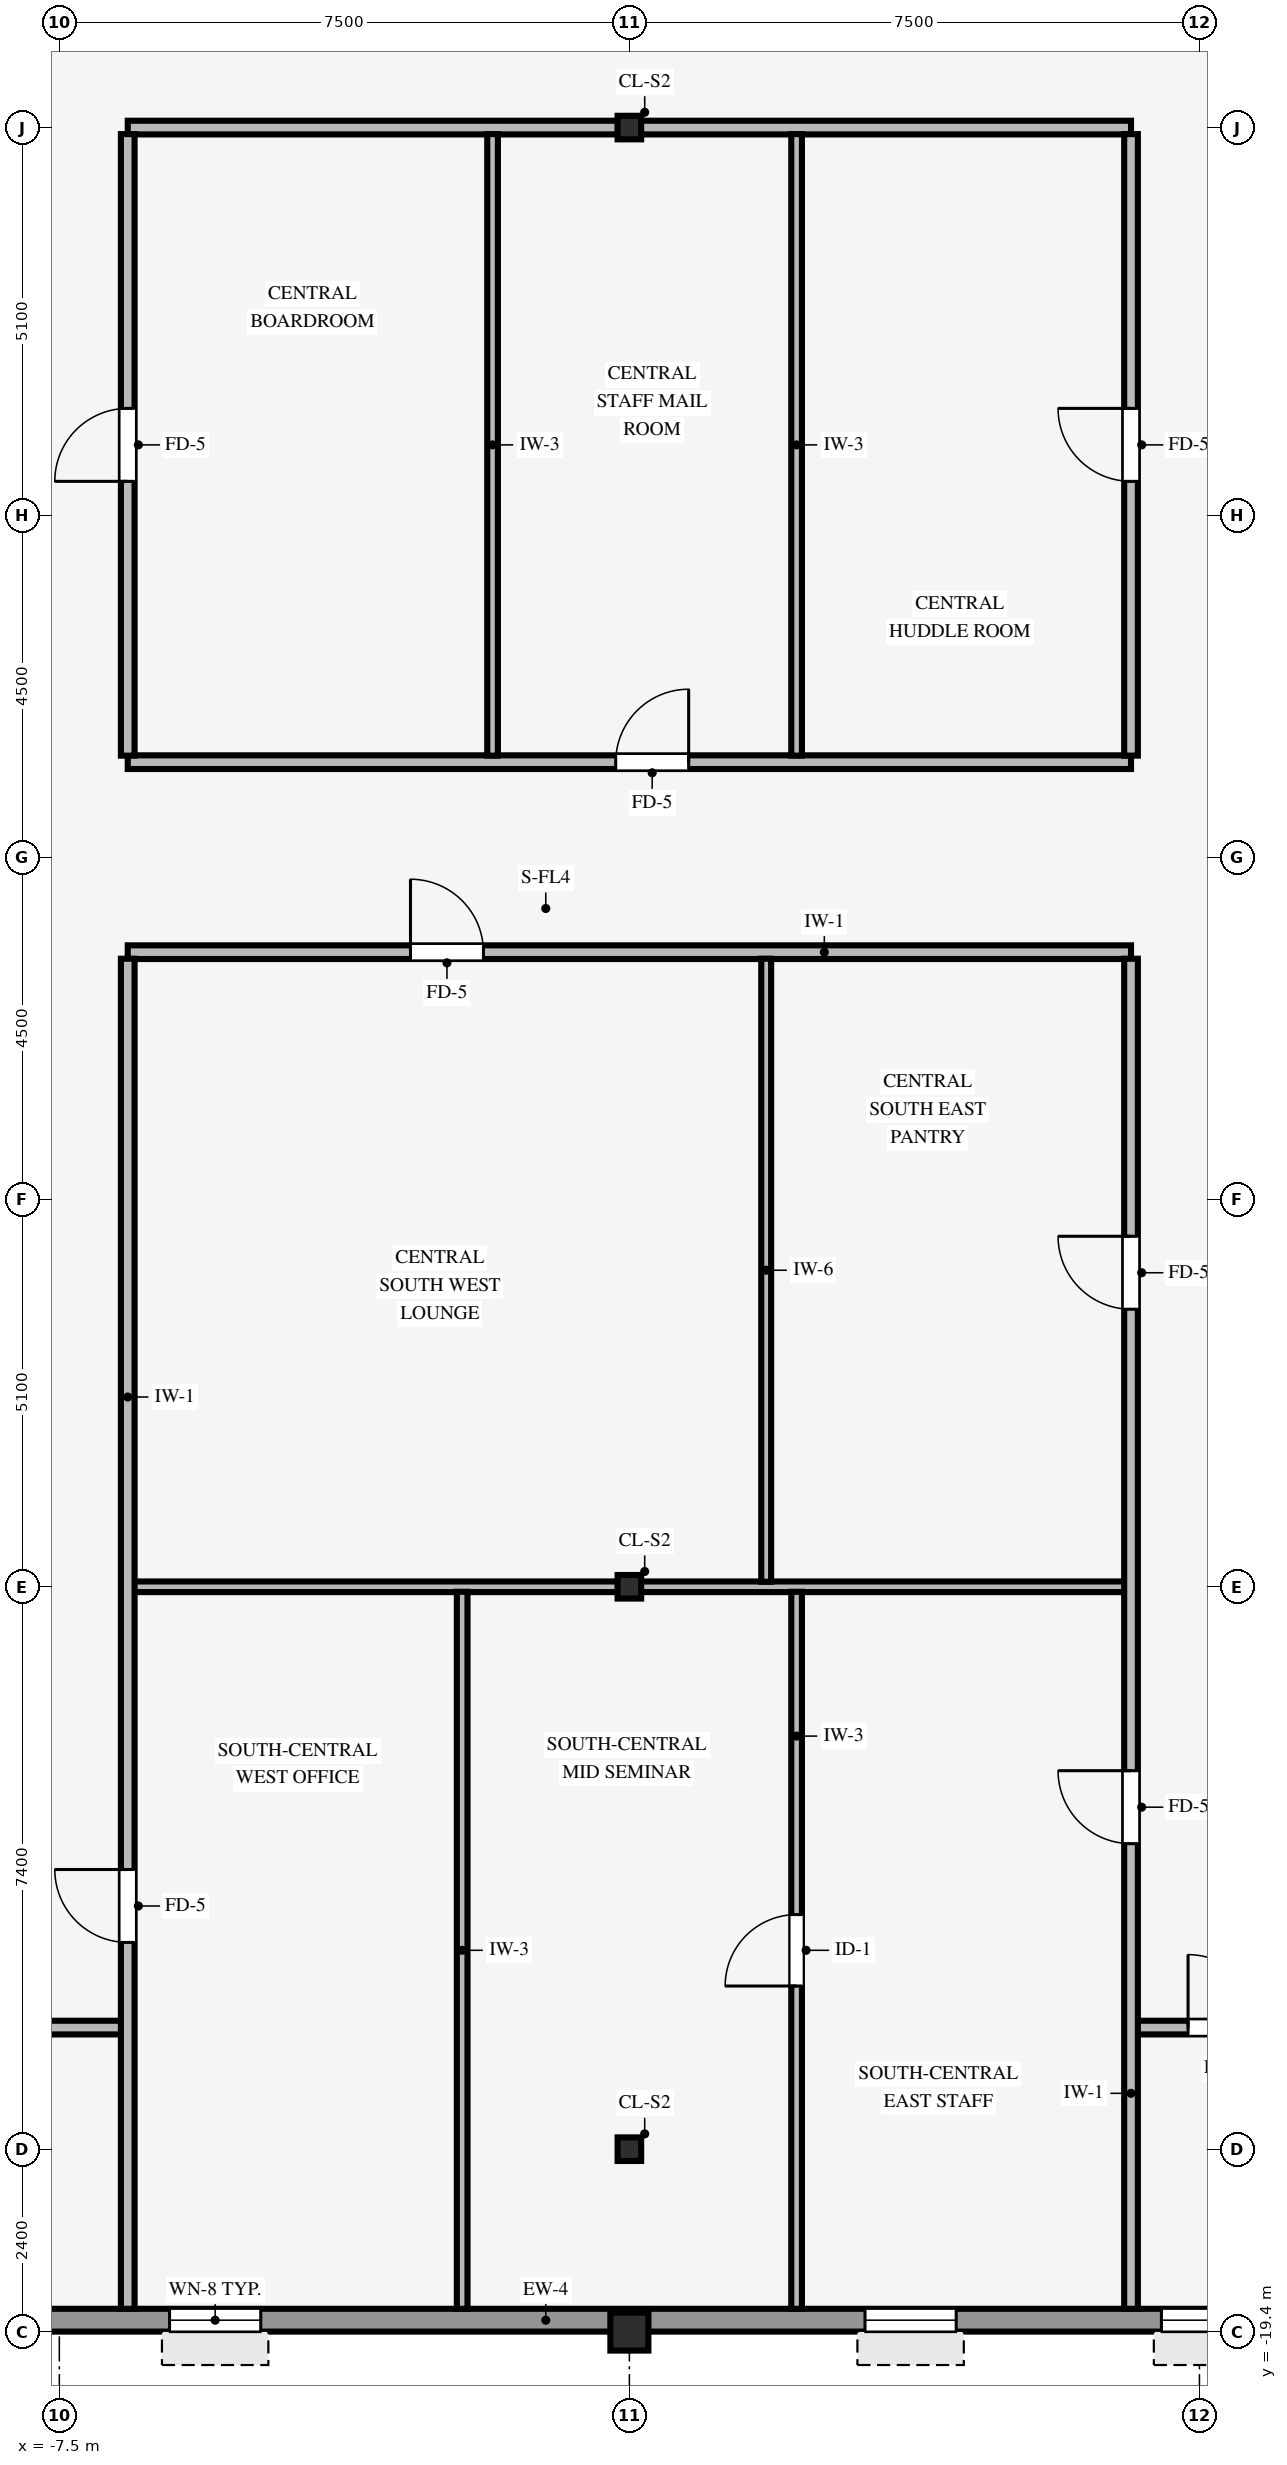
"""IFC4 building model, lengths in metres.
Left out: names, types, materials, properties, quantities, classifications, styles, units other than length and angle.
Written with IfcOpenShell. Run it as: python <this file> out.ifc"""

import sys

from ifc_helpers import new_model, si_unit, direction, frame, frame_2d, origin, origin_2d, place, context, subcontext, project, spatial, rectangle, hollow_rectangle, i_section, extrude, source, transform, mapped, element, fill, save


model = new_model("IFC4")
c1 = context("Model", 3, precision=1e-05, world=origin(), true_north=direction((0.0, 1.0)))
c2 = subcontext(c1, "Body", "Model", "MODEL_VIEW")
j1 = project(units=[si_unit("LENGTHUNIT", "METRE"), si_unit("PLANEANGLEUNIT", "RADIAN")], contexts=[c1])
p1 = place(None, origin())
s1 = spatial("IfcSite", under=j1, at=p1, CompositionType="ELEMENT")
p2 = place(p1, origin())
s2 = spatial("IfcBuilding", under=s1, at=p2, CompositionType="ELEMENT")
p3 = place(p2, frame((0.0, 0.0, 272.55)))
s3 = spatial("IfcBuildingStorey", under=s2, at=p3, CompositionType="ELEMENT", Elevation=272.55)
p4 = place(p3, frame((0.0, -19.4, 0.0), z_axis=(0.0, 0.0, 1.0), x_axis=(1.0, 0.0, 0.0)))
e1 = element("IfcColumn", 1, at=p4, inside=s3, PredefinedType="COLUMN", context=c2, shape_type="SweptSolid", body=[
    extrude(hollow_rectangle(XDim=0.5, YDim=0.5, WallThickness=0.032, InnerFilletRadius=0.032, OuterFilletRadius=0.064, at=origin_2d()), origin(), (0.0, 0.0, 1.0), 3.37),
])
for number, where, z_axis, x_axis in (
    (2, (0.0, -17.0, 0.0), (0.0, 0.0, 1.0), (1.0, 0.0, 0.0)),
    (3, (0.0, -9.6, 0.0), (0.0, 0.0, 1.0), (1.0, 0.0, 0.0)),
    (4, (0.0, 9.6, 0.0), (0.0, 0.0, 1.0), (1.0, 0.0, 0.0)),
):
    element("IfcColumn", number, at=place(p3, frame(where, z_axis=z_axis, x_axis=x_axis)), inside=s3, PredefinedType="COLUMN", context=c2, shape_type="SweptSolid", body=[
        extrude(i_section(OverallWidth=0.31, OverallDepth=0.31, WebThickness=0.015, FlangeThickness=0.015, FilletRadius=0.015, at=origin_2d()), origin(), (0.0, 0.0, 1.0), 3.37),
    ])
p5 = place(p3, frame((-18.9, -19.25, 0.0), z_axis=(0.0, 0.0, 1.0), x_axis=(1.0, 0.0, 0.0)))
e5 = element("IfcWall", 5, at=p5, inside=s3, PredefinedType="STANDARD", context=c2, shape_type="SweptSolid", body=[
    extrude(rectangle(XDim=35.6, YDim=0.3, at=frame_2d((17.8, 0.0))), origin(), (0.0, 0.0, 1.0), 2.705),
])
p6 = place(p5, frame((1.9, 0.0, 0.8)))
e6 = element("IfcOpeningElement", 6, at=p6, cuts=e5, PredefinedType="OPENING", context=c2, shape_type="SweptSolid", body=[
    extrude(rectangle(XDim=1.2, YDim=1.48, at=frame_2d((0.6, 0.74))), frame((0.0, 0.16, 0.0), z_axis=(0.0, -1.0, 0.0), x_axis=(1.0, 0.0, 0.0)), (0.0, 0.0, 1.0), 0.32),
])
p7 = place(p5, frame((7.6, 0.0, 0.8)))
e7 = element("IfcOpeningElement", 7, at=p7, cuts=e5, PredefinedType="OPENING", context=c2, shape_type="SweptSolid", body=[
    extrude(rectangle(XDim=1.2, YDim=1.48, at=frame_2d((0.6, 0.74))), frame((0.0, 0.16, 0.0), z_axis=(0.0, -1.0, 0.0), x_axis=(1.0, 0.0, 0.0)), (0.0, 0.0, 1.0), 0.32),
])
p8 = place(p5, frame((12.85, 0.0, 0.8)))
e8 = element("IfcOpeningElement", 8, at=p8, cuts=e5, PredefinedType="OPENING", context=c2, shape_type="SweptSolid", body=[
    extrude(rectangle(XDim=1.2, YDim=1.48, at=frame_2d((0.6, 0.74))), frame((0.0, 0.16, 0.0), z_axis=(0.0, -1.0, 0.0), x_axis=(1.0, 0.0, 0.0)), (0.0, 0.0, 1.0), 0.32),
])
p9 = place(p5, frame((22.0, 0.0, 0.8)))
e9 = element("IfcOpeningElement", 9, at=p9, cuts=e5, PredefinedType="OPENING", context=c2, shape_type="SweptSolid", body=[
    extrude(rectangle(XDim=1.2, YDim=1.48, at=frame_2d((0.6, 0.74))), frame((0.0, 0.16, 0.0), z_axis=(0.0, -1.0, 0.0), x_axis=(1.0, 0.0, 0.0)), (0.0, 0.0, 1.0), 0.32),
])
p10 = place(p5, frame((25.9, 0.0, 0.8)))
e10 = element("IfcOpeningElement", 10, at=p10, cuts=e5, PredefinedType="OPENING", context=c2, shape_type="SweptSolid", body=[
    extrude(rectangle(XDim=1.2, YDim=1.48, at=frame_2d((0.6, 0.74))), frame((0.0, 0.16, 0.0), z_axis=(0.0, -1.0, 0.0), x_axis=(1.0, 0.0, 0.0)), (0.0, 0.0, 1.0), 0.32),
])
p11 = place(p5, frame((31.6, 0.0, 0.8)))
e11 = element("IfcOpeningElement", 11, at=p11, cuts=e5, PredefinedType="OPENING", context=c2, shape_type="SweptSolid", body=[
    extrude(rectangle(XDim=1.2, YDim=1.48, at=frame_2d((0.6, 0.74))), frame((0.0, 0.16, 0.0), z_axis=(0.0, -1.0, 0.0), x_axis=(1.0, 0.0, 0.0)), (0.0, 0.0, 1.0), 0.32),
])
p12 = place(p3, frame((-9.0, -15.4, 0.0), z_axis=(0.0, 0.0, 1.0), x_axis=(1.0, 0.0, 0.0)))
e12 = element("IfcWall", 12, at=p12, inside=s3, PredefinedType="PARTITIONING", context=c2, shape_type="SweptSolid", body=[
    extrude(rectangle(XDim=2.334, YDim=0.18, at=frame_2d((1.167, 0.0))), origin(), (0.0, 0.0, 1.0), 3.36),
])
p13 = place(p3, frame((6.661, -15.4, 0.0), z_axis=(0.0, 0.0, 1.0), x_axis=(1.0, 0.0, 0.0)))
e13 = element("IfcWall", 13, at=p13, inside=s3, PredefinedType="PARTITIONING", context=c2, shape_type="SweptSolid", body=[
    extrude(rectangle(XDim=11.839, YDim=0.18, at=frame_2d((5.919, 0.0))), origin(), (0.0, 0.0, 1.0), 3.36),
])
p14 = place(p13, frame((0.689, 0.0, 0.0)))
e14 = element("IfcOpeningElement", 14, at=p14, cuts=e13, PredefinedType="OPENING", context=c2, shape_type="SweptSolid", body=[
    extrude(rectangle(XDim=0.96, YDim=2.1, at=frame_2d((0.48, 1.05))), frame((0.0, 0.1, 0.0), z_axis=(0.0, -1.0, 0.0), x_axis=(1.0, 0.0, 0.0)), (0.0, 0.0, 1.0), 0.2),
])
p15 = place(p3, frame((-6.534, -9.6, 0.0), z_axis=(0.0, 0.0, 1.0), x_axis=(1.0, 0.0, 0.0)))
e15 = element("IfcWall", 15, at=p15, inside=s3, PredefinedType="PARTITIONING", context=c2, shape_type="SweptSolid", body=[
    extrude(rectangle(XDim=6.383, YDim=0.14, at=frame_2d((3.191, 0.0))), origin(), (0.0, 0.0, 1.0), 2.405),
])
p16 = place(p3, frame((0.151, -9.6, 0.0), z_axis=(0.0, 0.0, 1.0), x_axis=(1.0, 0.0, 0.0)))
e16 = element("IfcWall", 16, at=p16, inside=s3, PredefinedType="PARTITIONING", context=c2, shape_type="SweptSolid", body=[
    extrude(rectangle(XDim=6.388, YDim=0.14, at=frame_2d((3.194, 0.0))), origin(), (0.0, 0.0, 1.0), 2.405),
])
p17 = place(p3, frame((-6.6, -1.25, 0.0), z_axis=(0.0, 0.0, 1.0), x_axis=(1.0, 0.0, 0.0)))
e17 = element("IfcWall", 17, at=p17, inside=s3, PredefinedType="PARTITIONING", context=c2, shape_type="SweptSolid", body=[
    extrude(rectangle(XDim=13.2, YDim=0.18, at=frame_2d((6.6, 0.0))), origin(), (0.0, 0.0, 1.0), 3.36),
])
p18 = place(p17, frame((3.72, 0.0, 0.0)))
e18 = element("IfcOpeningElement", 18, at=p18, cuts=e17, PredefinedType="OPENING", context=c2, shape_type="SweptSolid", body=[
    extrude(rectangle(XDim=0.96, YDim=2.1, at=frame_2d((0.48, 1.05))), frame((0.0, 0.1, 0.0), z_axis=(0.0, -1.0, 0.0), x_axis=(1.0, 0.0, 0.0)), (0.0, 0.0, 1.0), 0.2),
])
p19 = place(p3, frame((-6.6, 1.25, 0.0), z_axis=(0.0, 0.0, 1.0), x_axis=(1.0, 0.0, 0.0)))
e19 = element("IfcWall", 19, at=p19, inside=s3, PredefinedType="PARTITIONING", context=c2, shape_type="SweptSolid", body=[
    extrude(rectangle(XDim=13.2, YDim=0.18, at=frame_2d((6.6, 0.0))), origin(), (0.0, 0.0, 1.0), 3.36),
])
p20 = place(p19, frame((6.42, 0.0, 0.0)))
e20 = element("IfcOpeningElement", 20, at=p20, cuts=e19, PredefinedType="OPENING", context=c2, shape_type="SweptSolid", body=[
    extrude(rectangle(XDim=0.96, YDim=2.1, at=frame_2d((0.48, 1.05))), frame((0.0, 0.1, 0.0), z_axis=(0.0, -1.0, 0.0), x_axis=(1.0, 0.0, 0.0)), (0.0, 0.0, 1.0), 0.2),
])
for number, where, z_axis, x_axis in (
    (21, (-6.6, 9.6, 0.0), (0.0, 0.0, 1.0), (1.0, 0.0, 0.0)),
    (22, (0.151, 9.6, 0.0), (0.0, 0.0, 1.0), (1.0, 0.0, 0.0)),
):
    element("IfcWall", number, at=place(p3, frame(where, z_axis=z_axis, x_axis=x_axis)), inside=s3, PredefinedType="PARTITIONING", context=c2, shape_type="SweptSolid", body=[
        extrude(rectangle(XDim=6.449, YDim=0.18, at=frame_2d((3.225, 0.0))), origin(), (0.0, 0.0, 1.0), 2.405),
    ])
p21 = place(p3, frame((-6.6, -19.1, 0.0), z_axis=(0.0, 0.0, 1.0), x_axis=(0.0, 1.0, 0.0)))
e23 = element("IfcWall", 23, at=p21, inside=s3, PredefinedType="PARTITIONING", context=c2, shape_type="SweptSolid", body=[
    extrude(rectangle(XDim=17.764, YDim=0.18, at=frame_2d((8.882, 0.0))), origin(), (0.0, 0.0, 1.0), 3.36),
])
p22 = place(p21, frame((4.82, 0.0, 0.0)))
e24 = element("IfcOpeningElement", 24, at=p22, cuts=e23, PredefinedType="OPENING", context=c2, shape_type="SweptSolid", body=[
    extrude(rectangle(XDim=0.96, YDim=2.1, at=frame_2d((0.48, 1.05))), frame((0.0, 0.1, 0.0), z_axis=(0.0, -1.0, 0.0), x_axis=(1.0, 0.0, 0.0)), (0.0, 0.0, 1.0), 0.2),
])
p23 = place(p3, frame((-6.6, 1.336, 0.0), z_axis=(0.0, 0.0, 1.0), x_axis=(0.0, 1.0, 0.0)))
e25 = element("IfcWall", 25, at=p23, inside=s3, PredefinedType="PARTITIONING", context=c2, shape_type="SweptSolid", body=[
    extrude(rectangle(XDim=8.178, YDim=0.18, at=frame_2d((4.089, 0.0))), origin(), (0.0, 0.0, 1.0), 3.36),
])
p24 = place(p23, frame((3.609, 0.0, 0.0)))
e26 = element("IfcOpeningElement", 26, at=p24, cuts=e25, PredefinedType="OPENING", context=c2, shape_type="SweptSolid", body=[
    extrude(rectangle(XDim=0.96, YDim=2.1, at=frame_2d((0.48, 1.05))), frame((0.0, 0.1, 0.0), z_axis=(0.0, -1.0, 0.0), x_axis=(1.0, 0.0, 0.0)), (0.0, 0.0, 1.0), 0.2),
])
p25 = place(p3, frame((-2.2, -19.1, 0.0), z_axis=(0.0, 0.0, 1.0), x_axis=(0.0, 1.0, 0.0)))
e27 = element("IfcWall", 27, at=p25, inside=s3, PredefinedType="PARTITIONING", context=c2, shape_type="SweptSolid", body=[
    extrude(rectangle(XDim=9.434, YDim=0.14, at=frame_2d((4.717, 0.0))), origin(), (0.0, 0.0, 1.0), 3.36),
])
p26 = place(p3, frame((-1.8, 1.336, 0.0), z_axis=(0.0, 0.0, 1.0), x_axis=(0.0, 1.0, 0.0)))
e28 = element("IfcWall", 28, at=p26, inside=s3, PredefinedType="PARTITIONING", context=c2, shape_type="SweptSolid", body=[
    extrude(rectangle(XDim=8.178, YDim=0.14, at=frame_2d((4.089, 0.0))), origin(), (0.0, 0.0, 1.0), 3.36),
])
p27 = place(p3, frame((1.8, -9.534, 0.0), z_axis=(0.0, 0.0, 1.0), x_axis=(0.0, 1.0, 0.0)))
e29 = element("IfcWall", 29, at=p27, inside=s3, PredefinedType="PARTITIONING", context=c2, shape_type="SweptSolid", body=[
    extrude(rectangle(XDim=8.198, YDim=0.13, at=frame_2d((4.099, 0.0))), origin(), (0.0, 0.0, 1.0), 3.36),
])
p28 = place(p3, frame((2.2, -19.1, 0.0), z_axis=(0.0, 0.0, 1.0), x_axis=(0.0, 1.0, 0.0)))
e30 = element("IfcWall", 30, at=p28, inside=s3, PredefinedType="PARTITIONING", context=c2, shape_type="SweptSolid", body=[
    extrude(rectangle(XDim=9.434, YDim=0.14, at=frame_2d((4.717, 0.0))), origin(), (0.0, 0.0, 1.0), 3.36),
])
p29 = place(p28, frame((4.247, 0.0, 0.0)))
e31 = element("IfcOpeningElement", 31, at=p29, cuts=e30, PredefinedType="OPENING", context=c2, shape_type="SweptSolid", body=[
    extrude(rectangle(XDim=0.94, YDim=2.1, at=frame_2d((0.47, 1.05))), frame((0.0, 0.08, 0.0), z_axis=(0.0, -1.0, 0.0), x_axis=(1.0, 0.0, 0.0)), (0.0, 0.0, 1.0), 0.16),
])
p30 = place(p3, frame((2.2, 1.336, 0.0), z_axis=(0.0, 0.0, 1.0), x_axis=(0.0, 1.0, 0.0)))
e32 = element("IfcWall", 32, at=p30, inside=s3, PredefinedType="PARTITIONING", context=c2, shape_type="SweptSolid", body=[
    extrude(rectangle(XDim=8.178, YDim=0.14, at=frame_2d((4.089, 0.0))), origin(), (0.0, 0.0, 1.0), 3.36),
])
p31 = place(p3, frame((6.6, -19.1, 0.0), z_axis=(0.0, 0.0, 1.0), x_axis=(0.0, 1.0, 0.0)))
e33 = element("IfcWall", 33, at=p31, inside=s3, PredefinedType="PARTITIONING", context=c2, shape_type="SweptSolid", body=[
    extrude(rectangle(XDim=17.764, YDim=0.18, at=frame_2d((8.882, 0.0))), origin(), (0.0, 0.0, 1.0), 3.36),
])
p32 = place(p31, frame((13.152, 0.0, 0.0)))
e34 = element("IfcOpeningElement", 34, at=p32, cuts=e33, PredefinedType="OPENING", context=c2, shape_type="SweptSolid", body=[
    extrude(rectangle(XDim=0.96, YDim=2.1, at=frame_2d((0.48, 1.05))), frame((0.0, 0.1, 0.0), z_axis=(0.0, -1.0, 0.0), x_axis=(1.0, 0.0, 0.0)), (0.0, 0.0, 1.0), 0.2),
])
p33 = place(p31, frame((6.12, 0.0, 0.0)))
e35 = element("IfcOpeningElement", 35, at=p33, cuts=e33, PredefinedType="OPENING", context=c2, shape_type="SweptSolid", body=[
    extrude(rectangle(XDim=0.96, YDim=2.1, at=frame_2d((0.48, 1.05))), frame((0.0, 0.1, 0.0), z_axis=(0.0, -1.0, 0.0), x_axis=(1.0, 0.0, 0.0)), (0.0, 0.0, 1.0), 0.2),
])
p34 = place(p3, frame((6.6, 1.336, 0.0), z_axis=(0.0, 0.0, 1.0), x_axis=(0.0, 1.0, 0.0)))
e36 = element("IfcWall", 36, at=p34, inside=s3, PredefinedType="PARTITIONING", context=c2, shape_type="SweptSolid", body=[
    extrude(rectangle(XDim=8.178, YDim=0.18, at=frame_2d((4.089, 0.0))), origin(), (0.0, 0.0, 1.0), 3.36),
])
p35 = place(p34, frame((3.609, 0.0, 0.0)))
e37 = element("IfcOpeningElement", 37, at=p35, cuts=e36, PredefinedType="OPENING", context=c2, shape_type="SweptSolid", body=[
    extrude(rectangle(XDim=0.96, YDim=2.1, at=frame_2d((0.48, 1.05))), frame((0.0, 0.1, 0.0), z_axis=(0.0, -1.0, 0.0), x_axis=(1.0, 0.0, 0.0)), (0.0, 0.0, 1.0), 0.2),
])
m1 = source(origin(), c2, "Body", "SweptSolid", [
    extrude(rectangle(XDim=1.2, YDim=1.48, at=frame_2d((0.6, 0.74))), frame((0.0, 0.03, 0.0), z_axis=(0.0, -1.0, 0.0), x_axis=(1.0, 0.0, 0.0)), (0.0, 0.0, 1.0), 0.06),
])
p36 = place(p8, origin())
e38 = element("IfcWindow", 38, at=p36, inside=s3, PartitioningType="SINGLE_PANEL", PredefinedType="WINDOW", context=c2, shape_type="MappedRepresentation", body=[
    mapped(m1, transform((0.0, 0.0, 0.0), scale=1.0)),
])
fill(e8, e38)
p37 = place(p9, origin())
e39 = element("IfcWindow", 39, at=p37, inside=s3, PartitioningType="SINGLE_PANEL", PredefinedType="WINDOW", context=c2, shape_type="MappedRepresentation", body=[
    mapped(m1, transform((0.0, 0.0, 0.0), scale=1.0)),
])
fill(e9, e39)
p38 = place(p10, origin())
e40 = element("IfcWindow", 40, at=p38, inside=s3, PartitioningType="SINGLE_PANEL", PredefinedType="WINDOW", context=c2, shape_type="MappedRepresentation", body=[
    mapped(m1, transform((0.0, 0.0, 0.0), scale=1.0)),
])
fill(e10, e40)
m2 = source(origin(), c2, "Body", "SweptSolid", [
    extrude(rectangle(XDim=0.96, YDim=2.1, at=frame_2d((0.48, 1.05))), frame((0.0, 0.025, 0.0), z_axis=(0.0, -1.0, 0.0), x_axis=(1.0, 0.0, 0.0)), (0.0, 0.0, 1.0), 0.05),
])
p39 = place(p18, origin())
e41 = element("IfcDoor", 41, at=p39, inside=s3, OperationType="SINGLE_SWING_LEFT", PredefinedType="DOOR", context=c2, shape_type="MappedRepresentation", body=[
    mapped(m2, transform((0.0, 0.0, 0.0), scale=1.0)),
])
fill(e18, e41)
p40 = place(p32, origin())
e42 = element("IfcDoor", 42, at=p40, inside=s3, OperationType="SINGLE_SWING_RIGHT", PredefinedType="DOOR", context=c2, shape_type="MappedRepresentation", body=[
    mapped(m2, transform((0.0, 0.0, 0.0), scale=1.0)),
])
fill(e34, e42)
p41 = place(p24, origin())
e43 = element("IfcDoor", 43, at=p41, inside=s3, OperationType="SINGLE_SWING_LEFT", PredefinedType="DOOR", context=c2, shape_type="MappedRepresentation", body=[
    mapped(m2, transform((0.0, 0.0, 0.0), scale=1.0)),
])
fill(e26, e43)
p42 = place(p35, origin())
e44 = element("IfcDoor", 44, at=p42, inside=s3, OperationType="SINGLE_SWING_RIGHT", PredefinedType="DOOR", context=c2, shape_type="MappedRepresentation", body=[
    mapped(m2, transform((0.0, 0.0, 0.0), scale=1.0)),
])
fill(e37, e44)
p43 = place(p33, origin())
e45 = element("IfcDoor", 45, at=p43, inside=s3, OperationType="SINGLE_SWING_RIGHT", PredefinedType="DOOR", context=c2, shape_type="MappedRepresentation", body=[
    mapped(m2, transform((0.0, 0.0, 0.0), scale=1.0)),
])
fill(e35, e45)
p44 = place(p20, origin())
e46 = element("IfcDoor", 46, at=p44, inside=s3, OperationType="SINGLE_SWING_RIGHT", PredefinedType="DOOR", context=c2, shape_type="MappedRepresentation", body=[
    mapped(m2, transform((0.0, 0.0, 0.0), scale=1.0)),
])
fill(e20, e46)
p45 = place(p22, origin())
e47 = element("IfcDoor", 47, at=p45, inside=s3, OperationType="SINGLE_SWING_RIGHT", PredefinedType="DOOR", context=c2, shape_type="MappedRepresentation", body=[
    mapped(m2, transform((0.0, 0.0, 0.0), scale=1.0)),
])
fill(e24, e47)
p46 = place(p14, origin())
e48 = element("IfcDoor", 48, at=p46, inside=s3, OperationType="SINGLE_SWING_LEFT", PredefinedType="DOOR", context=c2, shape_type="MappedRepresentation", body=[
    mapped(m2, transform((0.0, 0.0, 0.0), scale=1.0)),
])
fill(e14, e48)
m3 = source(origin(), c2, "Body", "SweptSolid", [
    extrude(rectangle(XDim=0.94, YDim=2.1, at=frame_2d((0.47, 1.05))), frame((0.0, 0.025, 0.0), z_axis=(0.0, -1.0, 0.0), x_axis=(1.0, 0.0, 0.0)), (0.0, 0.0, 1.0), 0.05),
])
p47 = place(p29, origin())
e49 = element("IfcDoor", 49, at=p47, inside=s3, OperationType="SINGLE_SWING_LEFT", PredefinedType="DOOR", context=c2, shape_type="MappedRepresentation", body=[
    mapped(m3, transform((0.0, 0.0, 0.0), scale=1.0)),
])
fill(e31, e49)
save(model, sys.argv[1])
